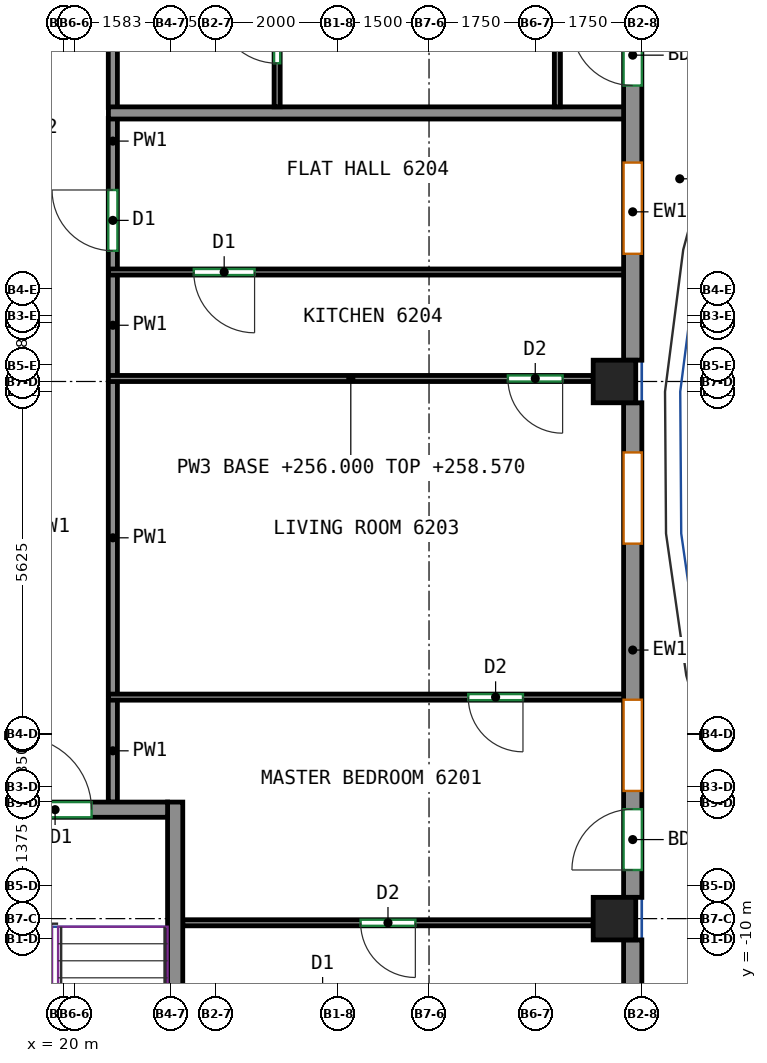
"""IFC4 building model, lengths in metres.
Left out: names, types, materials, properties, quantities, classifications, styles, units other than length and angle.
Written with IfcOpenShell. Run it as: python <this file> out.ifc"""

import sys

from ifc_helpers import new_model, si_unit, direction, frame, frame_2d, origin, origin_2d, place, context, subcontext, project, spatial, rectangle, extrude, source, transform, mapped, element, fill, save


model = new_model("IFC4")
c1 = context("Model", 3, precision=1e-05, world=origin(), true_north=direction((0.0, 1.0)))
c2 = subcontext(c1, "Body", "Model", "MODEL_VIEW")
j1 = project(units=[si_unit("LENGTHUNIT", "METRE"), si_unit("PLANEANGLEUNIT", "RADIAN")], contexts=[c1])
p1 = place(None, origin())
s1 = spatial("IfcSite", under=j1, at=p1, CompositionType="ELEMENT")
p2 = place(p1, origin())
s2 = spatial("IfcBuilding", under=s1, at=p2, CompositionType="ELEMENT")
p3 = place(p2, frame((0.0, 0.0, 256.0)))
s3 = spatial("IfcBuildingStorey", under=s2, at=p3, CompositionType="ELEMENT", Elevation=256.0)
m1 = source(origin(), c2, "Body", "SweptSolid", [
    extrude(rectangle(XDim=0.7, YDim=0.7, at=origin_2d()), origin(), (0.0, 0.0, 1.0), 3.12),
])
for number, where, z_axis, x_axis in (
    (1, (29.05, -9.667, 0.0), (0.0, 0.0, 1.0), (1.0, 0.0, 0.0)),
    (2, (29.05, -0.833, 0.0), (0.0, 0.0, 1.0), (1.0, 0.0, 0.0)),
):
    element("IfcColumn", number, at=place(p3, frame(where, z_axis=z_axis, x_axis=x_axis)), inside=s3, PredefinedType="COLUMN", context=c2, shape_type="MappedRepresentation", body=[
        mapped(m1, transform((0.0, 0.0, 0.0))),
    ])
m2 = source(origin(), c2, "Body", "SweptSolid", [
    extrude(rectangle(XDim=8.0, YDim=0.25, at=frame_2d((4.0, 0.0))), origin(), (0.0, 0.0, 1.0), 3.12),
])
p4 = place(p3, frame((21.825, -15.75, 0.0), z_axis=(0.0, 0.0, 1.0), x_axis=(0.0, 1.0, 0.0)))
e3 = element("IfcWall", 3, at=p4, inside=s3, PredefinedType="SHEAR", context=c2, shape_type="MappedRepresentation", body=[
    mapped(m2, transform((0.0, 0.0, 0.0))),
])
m3 = source(origin(), c2, "Body", "SweptSolid", [
    extrude(rectangle(XDim=3.7, YDim=0.25, at=frame_2d((1.85, 0.0))), origin(), (0.0, 0.0, 1.0), 3.12),
])
p5 = place(p3, frame((18.0, -7.875, 0.0), z_axis=(0.0, 0.0, 1.0), x_axis=(1.0, 0.0, 0.0)))
e4 = element("IfcWall", 4, at=p5, inside=s3, PredefinedType="SHEAR", context=c2, shape_type="MappedRepresentation", body=[
    mapped(m3, transform((0.0, 0.0, 0.0))),
])
p6 = place(p5, frame((1.25, 0.0, 0.0)))
e5 = element("IfcOpeningElement", 5, at=p6, cuts=e4, PredefinedType="OPENING", context=c2, shape_type="SweptSolid", body=[
    extrude(rectangle(XDim=1.2, YDim=2.1, at=frame_2d((0.6, 1.05))), frame((0.0, 0.135, 0.0), z_axis=(0.0, -1.0, 0.0), x_axis=(1.0, 0.0, 0.0)), (0.0, 0.0, 1.0), 0.27),
])
m4 = source(origin(), c2, "Body", "SweptSolid", [
    extrude(rectangle(XDim=4.315, YDim=0.3, at=frame_2d((2.158, 0.0))), origin(), (0.0, 0.0, 1.0), 3.12),
])
p7 = place(p3, frame((29.35, -14.332, 0.0), z_axis=(0.0, 0.0, 1.0), x_axis=(0.0, 1.0, 0.0)))
e6 = element("IfcWall", 6, at=p7, inside=s3, PredefinedType="SOLIDWALL", context=c2, shape_type="MappedRepresentation", body=[
    mapped(m4, transform((0.0, 0.0, 0.0))),
])
p8 = place(p7, frame((1.75, 0.0, 0.8)))
e7 = element("IfcOpeningElement", 7, at=p8, cuts=e6, PredefinedType="OPENING", context=c2, shape_type="SweptSolid", body=[
    extrude(rectangle(XDim=1.5, YDim=2.05, at=frame_2d((0.75, 1.025))), frame((0.0, 0.16, 0.0), z_axis=(0.0, -1.0, 0.0), x_axis=(1.0, 0.0, 0.0)), (0.0, 0.0, 1.0), 0.32),
])
p9 = place(p7, frame((0.45, 0.0, 0.0)))
e8 = element("IfcOpeningElement", 8, at=p9, cuts=e6, PredefinedType="OPENING", context=c2, shape_type="SweptSolid", body=[
    extrude(rectangle(XDim=1.0, YDim=2.1, at=frame_2d((0.5, 1.05))), frame((0.0, 0.16, 0.0), z_axis=(0.0, -1.0, 0.0), x_axis=(1.0, 0.0, 0.0)), (0.0, 0.0, 1.0), 0.32),
])
m5 = source(origin(), c2, "Body", "SweptSolid", [
    extrude(rectangle(XDim=8.133, YDim=0.3, at=frame_2d((4.067, 0.0))), origin(), (0.0, 0.0, 1.0), 3.12),
])
p10 = place(p3, frame((29.35, -9.317, 0.0), z_axis=(0.0, 0.0, 1.0), x_axis=(0.0, 1.0, 0.0)))
e9 = element("IfcWall", 9, at=p10, inside=s3, PredefinedType="SOLIDWALL", context=c2, shape_type="MappedRepresentation", body=[
    mapped(m5, transform((0.0, 0.0, 0.0))),
])
p11 = place(p10, frame((1.75, 0.0, 0.8)))
e10 = element("IfcOpeningElement", 10, at=p11, cuts=e9, PredefinedType="OPENING", context=c2, shape_type="SweptSolid", body=[
    extrude(rectangle(XDim=1.5, YDim=2.05, at=frame_2d((0.75, 1.025))), frame((0.0, 0.16, 0.0), z_axis=(0.0, -1.0, 0.0), x_axis=(1.0, 0.0, 0.0)), (0.0, 0.0, 1.0), 0.32),
])
p12 = place(p10, frame((0.45, 0.0, 0.0)))
e11 = element("IfcOpeningElement", 11, at=p12, cuts=e9, PredefinedType="OPENING", context=c2, shape_type="SweptSolid", body=[
    extrude(rectangle(XDim=1.0, YDim=2.1, at=frame_2d((0.5, 1.05))), frame((0.0, 0.16, 0.0), z_axis=(0.0, -1.0, 0.0), x_axis=(1.0, 0.0, 0.0)), (0.0, 0.0, 1.0), 0.32),
])
p13 = place(p10, frame((5.817, 0.0, 0.8)))
e12 = element("IfcOpeningElement", 12, at=p13, cuts=e9, PredefinedType="OPENING", context=c2, shape_type="SweptSolid", body=[
    extrude(rectangle(XDim=1.5, YDim=2.05, at=frame_2d((0.75, 1.025))), frame((0.0, 0.16, 0.0), z_axis=(0.0, -1.0, 0.0), x_axis=(1.0, 0.0, 0.0)), (0.0, 0.0, 1.0), 0.32),
])
p14 = place(p3, frame((29.35, -0.483, 0.0), z_axis=(0.0, 0.0, 1.0), x_axis=(0.0, 1.0, 0.0)))
e13 = element("IfcWall", 13, at=p14, inside=s3, PredefinedType="SOLIDWALL", context=c2, shape_type="MappedRepresentation", body=[
    mapped(m5, transform((0.0, 0.0, 0.0))),
])
p15 = place(p14, frame((1.75, 0.0, 0.8)))
e14 = element("IfcOpeningElement", 14, at=p15, cuts=e13, PredefinedType="OPENING", context=c2, shape_type="SweptSolid", body=[
    extrude(rectangle(XDim=1.5, YDim=2.05, at=frame_2d((0.75, 1.025))), frame((0.0, 0.16, 0.0), z_axis=(0.0, -1.0, 0.0), x_axis=(1.0, 0.0, 0.0)), (0.0, 0.0, 1.0), 0.32),
])
p16 = place(p14, frame((5.817, 0.0, 0.8)))
e15 = element("IfcOpeningElement", 15, at=p16, cuts=e13, PredefinedType="OPENING", context=c2, shape_type="SweptSolid", body=[
    extrude(rectangle(XDim=1.5, YDim=2.05, at=frame_2d((0.75, 1.025))), frame((0.0, 0.16, 0.0), z_axis=(0.0, -1.0, 0.0), x_axis=(1.0, 0.0, 0.0)), (0.0, 0.0, 1.0), 0.32),
])
p17 = place(p14, frame((4.517, 0.0, 0.0)))
e16 = element("IfcOpeningElement", 16, at=p17, cuts=e13, PredefinedType="OPENING", context=c2, shape_type="SweptSolid", body=[
    extrude(rectangle(XDim=1.0, YDim=2.1, at=frame_2d((0.5, 1.05))), frame((0.0, 0.16, 0.0), z_axis=(0.0, -1.0, 0.0), x_axis=(1.0, 0.0, 0.0)), (0.0, 0.0, 1.0), 0.32),
])
p18 = place(p3, frame((20.8, -7.75, 0.0), z_axis=(0.0, 0.0, 1.0), x_axis=(0.0, 1.0, 0.0)))
e17 = element("IfcWall", 17, at=p18, inside=s3, PredefinedType="PARTITIONING", context=c2, shape_type="SweptSolid", body=[
    extrude(rectangle(XDim=1.686, YDim=0.15, at=frame_2d((0.843, 0.0))), origin(), (0.0, 0.0, 1.0), 3.12),
])
p19 = place(p3, frame((20.8, -5.984, 0.0), z_axis=(0.0, 0.0, 1.0), x_axis=(0.0, 1.0, 0.0)))
e18 = element("IfcWall", 18, at=p19, inside=s3, PredefinedType="PARTITIONING", context=c2, shape_type="SweptSolid", body=[
    extrude(rectangle(XDim=5.16, YDim=0.15, at=frame_2d((2.58, 0.0))), origin(), (0.0, 0.0, 1.0), 3.12),
])
p20 = place(p3, frame((20.8, -0.744, 0.0), z_axis=(0.0, 0.0, 1.0), x_axis=(0.0, 1.0, 0.0)))
e19 = element("IfcWall", 19, at=p20, inside=s3, PredefinedType="PARTITIONING", context=c2, shape_type="SweptSolid", body=[
    extrude(rectangle(XDim=1.671, YDim=0.15, at=frame_2d((0.835, 0.0))), origin(), (0.0, 0.0, 1.0), 3.12),
])
p21 = place(p3, frame((20.8, 1.007, 0.0), z_axis=(0.0, 0.0, 1.0), x_axis=(0.0, 1.0, 0.0)))
e20 = element("IfcWall", 20, at=p21, inside=s3, PredefinedType="PARTITIONING", context=c2, shape_type="SweptSolid", body=[
    extrude(rectangle(XDim=2.486, YDim=0.15, at=frame_2d((1.243, 0.0))), origin(), (0.0, 0.0, 1.0), 3.12),
])
p22 = place(p21, frame((0.309, 0.0, 0.0)))
e21 = element("IfcOpeningElement", 21, at=p22, cuts=e20, PredefinedType="OPENING", context=c2, shape_type="SweptSolid", body=[
    extrude(rectangle(XDim=1.0, YDim=2.1, at=frame_2d((0.5, 1.05))), frame((0.0, 0.085, 0.0), z_axis=(0.0, -1.0, 0.0), x_axis=(1.0, 0.0, 0.0)), (0.0, 0.0, 1.0), 0.17),
])
p23 = place(p3, frame((20.8, 3.673, 0.0), z_axis=(0.0, 0.0, 1.0), x_axis=(0.0, 1.0, 0.0)))
e22 = element("IfcWall", 22, at=p23, inside=s3, PredefinedType="PARTITIONING", context=c2, shape_type="SweptSolid", body=[
    extrude(rectangle(XDim=4.429, YDim=0.15, at=frame_2d((2.214, 0.0))), origin(), (0.0, 0.0, 1.0), 3.12),
])
p24 = place(p23, frame((1.21, 0.0, 0.0)))
e23 = element("IfcOpeningElement", 23, at=p24, cuts=e22, PredefinedType="OPENING", context=c2, shape_type="SweptSolid", body=[
    extrude(rectangle(XDim=1.0, YDim=2.1, at=frame_2d((0.5, 1.05))), frame((0.0, 0.085, 0.0), z_axis=(0.0, -1.0, 0.0), x_axis=(1.0, 0.0, 0.0)), (0.0, 0.0, 1.0), 0.17),
])
p25 = place(p3, frame((28.7, -9.735, 0.0), z_axis=(0.0, 0.0, 1.0), x_axis=(-1.0, 0.0, 0.0)))
e24 = element("IfcWall", 24, at=p25, inside=s3, PredefinedType="PARTITIONING", context=c2, shape_type="SweptSolid", body=[
    extrude(rectangle(XDim=6.75, YDim=0.1, at=frame_2d((3.375, 0.0))), origin(), (0.0, 0.0, 1.0), 3.12),
])
p26 = place(p25, frame((2.925, 0.0, 0.0)))
e25 = element("IfcOpeningElement", 25, at=p26, cuts=e24, PredefinedType="OPENING", context=c2, shape_type="SweptSolid", body=[
    extrude(rectangle(XDim=0.9, YDim=2.1, at=frame_2d((0.45, 1.05))), frame((0.0, 0.06, 0.0), z_axis=(0.0, -1.0, 0.0), x_axis=(1.0, 0.0, 0.0)), (0.0, 0.0, 1.0), 0.12),
])
p27 = place(p3, frame((29.25, -6.024, 0.0), z_axis=(0.0, 0.0, 1.0), x_axis=(-1.0, 0.0, 0.0)))
e26 = element("IfcWall", 26, at=p27, inside=s3, PredefinedType="PARTITIONING", context=c2, shape_type="SweptSolid", body=[
    extrude(rectangle(XDim=8.523, YDim=0.1, at=frame_2d((4.261, 0.0))), origin(), (0.0, 0.0, 1.0), 3.12),
])
p28 = place(p27, frame((1.705, 0.0, 0.0)))
e27 = element("IfcOpeningElement", 27, at=p28, cuts=e26, PredefinedType="OPENING", context=c2, shape_type="SweptSolid", body=[
    extrude(rectangle(XDim=0.9, YDim=2.1, at=frame_2d((0.45, 1.05))), frame((0.0, 0.06, 0.0), z_axis=(0.0, -1.0, 0.0), x_axis=(1.0, 0.0, 0.0)), (0.0, 0.0, 1.0), 0.12),
])
p29 = place(p3, frame((28.7, -0.784, 0.0), z_axis=(0.0, 0.0, 1.0), x_axis=(-1.0, 0.0, 0.0)))
e28 = element("IfcWall", 28, at=p29, inside=s3, PredefinedType="PARTITIONING", context=c2, shape_type="SweptSolid", body=[
    extrude(rectangle(XDim=7.973, YDim=0.1, at=frame_2d((3.986, 0.0))), origin(), (0.0, 0.0, 1.0), 2.57),
])
p30 = place(p29, frame((0.503, 0.0, 0.0)))
e29 = element("IfcOpeningElement", 29, at=p30, cuts=e28, PredefinedType="OPENING", context=c2, shape_type="SweptSolid", body=[
    extrude(rectangle(XDim=0.9, YDim=2.1, at=frame_2d((0.45, 1.05))), frame((0.0, 0.06, 0.0), z_axis=(0.0, -1.0, 0.0), x_axis=(1.0, 0.0, 0.0)), (0.0, 0.0, 1.0), 0.12),
])
p31 = place(p3, frame((29.25, 0.967, 0.0), z_axis=(0.0, 0.0, 1.0), x_axis=(-1.0, 0.0, 0.0)))
e30 = element("IfcWall", 30, at=p31, inside=s3, PredefinedType="PARTITIONING", context=c2, shape_type="SweptSolid", body=[
    extrude(rectangle(XDim=8.523, YDim=0.1, at=frame_2d((4.261, 0.0))), origin(), (0.0, 0.0, 1.0), 3.12),
])
p32 = place(p31, frame((6.119, 0.0, 0.0)))
e31 = element("IfcOpeningElement", 31, at=p32, cuts=e30, PredefinedType="OPENING", context=c2, shape_type="SweptSolid", body=[
    extrude(rectangle(XDim=1.0, YDim=2.1, at=frame_2d((0.5, 1.05))), frame((0.0, 0.06, 0.0), z_axis=(0.0, -1.0, 0.0), x_axis=(1.0, 0.0, 0.0)), (0.0, 0.0, 1.0), 0.12),
])
p33 = place(p3, frame((20.727, 3.583, 0.0), z_axis=(0.0, 0.0, 1.0), x_axis=(1.0, 0.0, 0.0)))
e32 = element("IfcWall", 32, at=p33, inside=s3, PredefinedType="PARTITIONING", context=c2, shape_type="SweptSolid", body=[
    extrude(rectangle(XDim=8.523, YDim=0.2, at=frame_2d((4.261, 0.0))), origin(), (0.0, 0.0, 1.0), 3.12),
])
p34 = place(p3, frame((23.502, 3.683, 0.0), z_axis=(0.0, 0.0, 1.0), x_axis=(0.0, 1.0, 0.0)))
e33 = element("IfcWall", 33, at=p34, inside=s3, PredefinedType="PARTITIONING", context=c2, shape_type="SweptSolid", body=[
    extrude(rectangle(XDim=3.158, YDim=0.1, at=frame_2d((1.579, 0.0))), origin(), (0.0, 0.0, 1.0), 3.12),
])
p35 = place(p34, frame((0.717, 0.0, 0.0)))
e34 = element("IfcOpeningElement", 34, at=p35, cuts=e33, PredefinedType="OPENING", context=c2, shape_type="SweptSolid", body=[
    extrude(rectangle(XDim=1.0, YDim=2.1, at=frame_2d((0.5, 1.05))), frame((0.0, 0.06, 0.0), z_axis=(0.0, -1.0, 0.0), x_axis=(1.0, 0.0, 0.0)), (0.0, 0.0, 1.0), 0.12),
])
p36 = place(p3, frame((28.111, 3.683, 0.0), z_axis=(0.0, 0.0, 1.0), x_axis=(0.0, 1.0, 0.0)))
e35 = element("IfcWall", 35, at=p36, inside=s3, PredefinedType="PARTITIONING", context=c2, shape_type="SweptSolid", body=[
    extrude(rectangle(XDim=9.058, YDim=0.1, at=frame_2d((4.529, 0.0))), origin(), (0.0, 0.0, 1.0), 3.12),
])
p37 = place(p36, frame((7.555, 0.0, 0.0)))
e36 = element("IfcOpeningElement", 36, at=p37, cuts=e35, PredefinedType="OPENING", context=c2, shape_type="SweptSolid", body=[
    extrude(rectangle(XDim=0.9, YDim=2.1, at=frame_2d((0.45, 1.05))), frame((0.0, 0.06, 0.0), z_axis=(0.0, -1.0, 0.0), x_axis=(1.0, 0.0, 0.0)), (0.0, 0.0, 1.0), 0.12),
])
p38 = place(p11, origin())
e37 = element("IfcWindow", 37, at=p38, inside=s3, PartitioningType="SINGLE_PANEL", PredefinedType="WINDOW", context=c2, shape_type="SweptSolid", body=[
    extrude(rectangle(XDim=1.5, YDim=2.05, at=frame_2d((0.75, 1.025))), frame((0.0, 0.03, 0.0), z_axis=(0.0, -1.0, 0.0), x_axis=(1.0, 0.0, 0.0)), (0.0, 0.0, 1.0), 0.06),
])
fill(e10, e37)
p39 = place(p12, origin())
e38 = element("IfcDoor", 38, at=p39, inside=s3, OperationType="SINGLE_SWING_LEFT", PredefinedType="DOOR", context=c2, shape_type="SweptSolid", body=[
    extrude(rectangle(XDim=1.0, YDim=2.1, at=frame_2d((0.5, 1.05))), frame((0.0, 0.025, 0.0), z_axis=(0.0, -1.0, 0.0), x_axis=(1.0, 0.0, 0.0)), (0.0, 0.0, 1.0), 0.05),
])
fill(e11, e38)
p40 = place(p13, origin())
e39 = element("IfcWindow", 39, at=p40, inside=s3, PartitioningType="SINGLE_PANEL", PredefinedType="WINDOW", context=c2, shape_type="SweptSolid", body=[
    extrude(rectangle(XDim=1.5, YDim=2.05, at=frame_2d((0.75, 1.025))), frame((0.0, 0.03, 0.0), z_axis=(0.0, -1.0, 0.0), x_axis=(1.0, 0.0, 0.0)), (0.0, 0.0, 1.0), 0.06),
])
fill(e12, e39)
p41 = place(p15, origin())
e40 = element("IfcWindow", 40, at=p41, inside=s3, PartitioningType="SINGLE_PANEL", PredefinedType="WINDOW", context=c2, shape_type="SweptSolid", body=[
    extrude(rectangle(XDim=1.5, YDim=2.05, at=frame_2d((0.75, 1.025))), frame((0.0, 0.03, 0.0), z_axis=(0.0, -1.0, 0.0), x_axis=(1.0, 0.0, 0.0)), (0.0, 0.0, 1.0), 0.06),
])
fill(e14, e40)
p42 = place(p17, origin())
e41 = element("IfcDoor", 41, at=p42, inside=s3, OperationType="SINGLE_SWING_RIGHT", PredefinedType="DOOR", context=c2, shape_type="SweptSolid", body=[
    extrude(rectangle(XDim=1.0, YDim=2.1, at=frame_2d((0.5, 1.05))), frame((0.0, 0.025, 0.0), z_axis=(0.0, -1.0, 0.0), x_axis=(1.0, 0.0, 0.0)), (0.0, 0.0, 1.0), 0.05),
])
fill(e16, e41)
p43 = place(p6, origin())
e42 = element("IfcDoor", 42, at=p43, inside=s3, OperationType="DOUBLE_DOOR_SINGLE_SWING", PredefinedType="DOOR", context=c2, shape_type="SweptSolid", body=[
    extrude(rectangle(XDim=1.2, YDim=2.1, at=frame_2d((0.6, 1.05))), frame((0.0, 0.025, 0.0), z_axis=(0.0, -1.0, 0.0), x_axis=(1.0, 0.0, 0.0)), (0.0, 0.0, 1.0), 0.05),
])
fill(e5, e42)
p44 = place(p26, origin())
e43 = element("IfcDoor", 43, at=p44, inside=s3, OperationType="SINGLE_SWING_LEFT", PredefinedType="DOOR", context=c2, shape_type="SweptSolid", body=[
    extrude(rectangle(XDim=0.9, YDim=2.1, at=frame_2d((0.45, 1.05))), frame((0.0, 0.025, 0.0), z_axis=(0.0, -1.0, 0.0), x_axis=(1.0, 0.0, 0.0)), (0.0, 0.0, 1.0), 0.05),
])
fill(e25, e43)
p45 = place(p28, origin())
e44 = element("IfcDoor", 44, at=p45, inside=s3, OperationType="SINGLE_SWING_LEFT", PredefinedType="DOOR", context=c2, shape_type="SweptSolid", body=[
    extrude(rectangle(XDim=0.9, YDim=2.1, at=frame_2d((0.45, 1.05))), frame((0.0, 0.025, 0.0), z_axis=(0.0, -1.0, 0.0), x_axis=(1.0, 0.0, 0.0)), (0.0, 0.0, 1.0), 0.05),
])
fill(e27, e44)
p46 = place(p30, origin())
e45 = element("IfcDoor", 45, at=p46, inside=s3, OperationType="SINGLE_SWING_LEFT", PredefinedType="DOOR", context=c2, shape_type="SweptSolid", body=[
    extrude(rectangle(XDim=0.9, YDim=2.1, at=frame_2d((0.45, 1.05))), frame((0.0, 0.025, 0.0), z_axis=(0.0, -1.0, 0.0), x_axis=(1.0, 0.0, 0.0)), (0.0, 0.0, 1.0), 0.05),
])
fill(e29, e45)
p47 = place(p32, origin())
e46 = element("IfcDoor", 46, at=p47, inside=s3, OperationType="SINGLE_SWING_LEFT", PredefinedType="DOOR", context=c2, shape_type="SweptSolid", body=[
    extrude(rectangle(XDim=1.0, YDim=2.1, at=frame_2d((0.5, 1.05))), frame((0.0, 0.025, 0.0), z_axis=(0.0, -1.0, 0.0), x_axis=(1.0, 0.0, 0.0)), (0.0, 0.0, 1.0), 0.05),
])
fill(e31, e46)
p48 = place(p22, origin())
e47 = element("IfcDoor", 47, at=p48, inside=s3, OperationType="SINGLE_SWING_RIGHT", PredefinedType="DOOR", context=c2, shape_type="SweptSolid", body=[
    extrude(rectangle(XDim=1.0, YDim=2.1, at=frame_2d((0.5, 1.05))), frame((0.0, 0.025, 0.0), z_axis=(0.0, -1.0, 0.0), x_axis=(1.0, 0.0, 0.0)), (0.0, 0.0, 1.0), 0.05),
])
fill(e21, e47)
p49 = place(p35, origin())
e48 = element("IfcDoor", 48, at=p49, inside=s3, OperationType="SINGLE_SWING_RIGHT", PredefinedType="DOOR", context=c2, shape_type="SweptSolid", body=[
    extrude(rectangle(XDim=1.0, YDim=2.1, at=frame_2d((0.5, 1.05))), frame((0.0, 0.025, 0.0), z_axis=(0.0, -1.0, 0.0), x_axis=(1.0, 0.0, 0.0)), (0.0, 0.0, 1.0), 0.05),
])
fill(e34, e48)
save(model, sys.argv[1])
